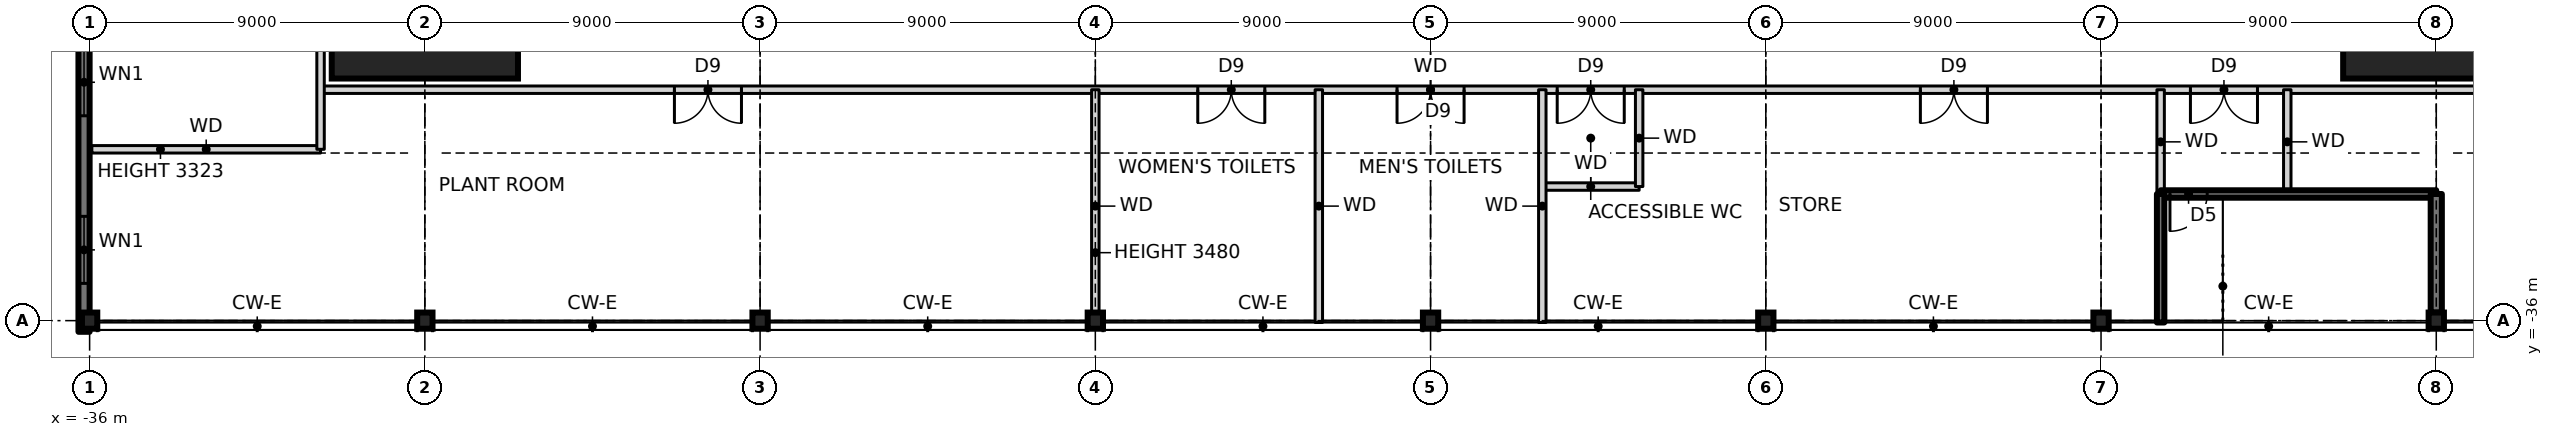
"""IFC4 building model, lengths in metres.
Left out: names, types, materials, properties, quantities, classifications, styles, units other than length and angle.
Written with IfcOpenShell. Run it as: python <this file> out.ifc"""

import sys

from ifc_helpers import new_model, si_unit, direction, frame, frame_2d, origin, origin_2d, place, context, subcontext, project, spatial, rectangle, i_section, extrude, element, fill, save


model = new_model("IFC4")
c1 = context("Model", 3, precision=1e-05, world=origin(), true_north=direction((0.0, 1.0)))
c2 = subcontext(c1, "Body", "Model", "MODEL_VIEW")
j1 = project(units=[si_unit("LENGTHUNIT", "METRE"), si_unit("PLANEANGLEUNIT", "RADIAN")], contexts=[c1])
p1 = place(None, origin())
s1 = spatial("IfcSite", under=j1, at=p1, CompositionType="ELEMENT")
p2 = place(p1, origin())
s2 = spatial("IfcBuilding", under=s1, at=p2, CompositionType="ELEMENT")
p3 = place(p2, frame((0.0, 0.0, 10.5)))
s3 = spatial("IfcBuildingStorey", under=s2, at=p3, CompositionType="ELEMENT", Elevation=10.5)
for number, where, z_axis, x_axis in (
    (1, (-27.0, -27.0, 0.0), (0.0, 0.0, 1.0), (1.0, 0.0, 0.0)),
    (2, (27.0, -27.0, 0.0), (0.0, 0.0, 1.0), (1.0, 0.0, 0.0)),
):
    element("IfcColumn", number, at=place(p3, frame(where, z_axis=z_axis, x_axis=x_axis)), inside=s3, PredefinedType="COLUMN", context=c2, shape_type="SweptSolid", body=[
        extrude(rectangle(XDim=5.0, YDim=5.0, at=origin_2d()), origin(), (0.0, 0.0, 1.0), 4.5),
        extrude(i_section(OverallWidth=0.478, OverallDepth=0.599, WebThickness=0.1, FlangeThickness=0.14, at=origin_2d()), origin(), (0.0, 0.0, 1.0), 4.5),
    ])
for number, where, z_axis, x_axis in (
    (3, (-36.0, -36.0, 0.0), (0.0, 0.0, 1.0), (1.0, 0.0, 0.0)),
    (4, (-27.0, -36.0, 0.0), (0.0, 0.0, 1.0), (1.0, 0.0, 0.0)),
    (5, (-18.0, -36.0, 0.0), (0.0, 0.0, 1.0), (1.0, 0.0, 0.0)),
    (6, (-9.0, -36.0, 0.0), (0.0, 0.0, 1.0), (1.0, 0.0, 0.0)),
    (7, (0.0, -36.0, 0.0), (0.0, 0.0, 1.0), (1.0, 0.0, 0.0)),
    (8, (9.0, -36.0, 0.0), (0.0, 0.0, 1.0), (1.0, 0.0, 0.0)),
    (9, (18.0, -36.0, 0.0), (0.0, 0.0, 1.0), (1.0, 0.0, 0.0)),
    (10, (27.0, -36.0, 0.0), (0.0, 0.0, 1.0), (1.0, 0.0, 0.0)),
):
    element("IfcColumn", number, at=place(p3, frame(where, z_axis=z_axis, x_axis=x_axis)), inside=s3, PredefinedType="COLUMN", context=c2, shape_type="SweptSolid", body=[
        extrude(i_section(OverallWidth=0.411, OverallDepth=0.434, WebThickness=0.036, FlangeThickness=0.057, at=origin_2d()), origin(), (0.0, 0.0, 1.0), 4.5),
    ])
p4 = place(p3, frame((-36.15, 36.3, -0.25), z_axis=(0.0, 0.0, 1.0), x_axis=(0.0, -1.0, 0.0)))
e11 = element("IfcWall", 11, at=p4, inside=s3, PredefinedType="SOLIDWALL", context=c2, shape_type="SweptSolid", body=[
    extrude(rectangle(XDim=72.6, YDim=0.3, at=frame_2d((36.3, 0.0))), origin(), (0.0, 0.0, 1.0), 4.75),
])
p5 = place(p4, frame((2.0, 0.0, 1.15)))
e12 = element("IfcOpeningElement", 12, at=p5, cuts=e11, PredefinedType="OPENING", context=c2, shape_type="SweptSolid", body=[
    extrude(rectangle(XDim=1.8, YDim=2.4, at=frame_2d((0.9, 1.2))), frame((0.0, 0.16, 0.0), z_axis=(0.0, -1.0, 0.0), x_axis=(1.0, 0.0, 0.0)), (0.0, 0.0, 1.0), 0.32),
])
p6 = place(p4, frame((6.5, 0.0, 1.15)))
e13 = element("IfcOpeningElement", 13, at=p6, cuts=e11, PredefinedType="OPENING", context=c2, shape_type="SweptSolid", body=[
    extrude(rectangle(XDim=1.8, YDim=2.4, at=frame_2d((0.9, 1.2))), frame((0.0, 0.16, 0.0), z_axis=(0.0, -1.0, 0.0), x_axis=(1.0, 0.0, 0.0)), (0.0, 0.0, 1.0), 0.32),
])
p7 = place(p4, frame((11.0, 0.0, 1.15)))
e14 = element("IfcOpeningElement", 14, at=p7, cuts=e11, PredefinedType="OPENING", context=c2, shape_type="SweptSolid", body=[
    extrude(rectangle(XDim=1.8, YDim=2.4, at=frame_2d((0.9, 1.2))), frame((0.0, 0.16, 0.0), z_axis=(0.0, -1.0, 0.0), x_axis=(1.0, 0.0, 0.0)), (0.0, 0.0, 1.0), 0.32),
])
p8 = place(p4, frame((15.5, 0.0, 1.15)))
e15 = element("IfcOpeningElement", 15, at=p8, cuts=e11, PredefinedType="OPENING", context=c2, shape_type="SweptSolid", body=[
    extrude(rectangle(XDim=1.8, YDim=2.4, at=frame_2d((0.9, 1.2))), frame((0.0, 0.16, 0.0), z_axis=(0.0, -1.0, 0.0), x_axis=(1.0, 0.0, 0.0)), (0.0, 0.0, 1.0), 0.32),
])
p9 = place(p4, frame((20.0, 0.0, 1.15)))
e16 = element("IfcOpeningElement", 16, at=p9, cuts=e11, PredefinedType="OPENING", context=c2, shape_type="SweptSolid", body=[
    extrude(rectangle(XDim=1.8, YDim=2.4, at=frame_2d((0.9, 1.2))), frame((0.0, 0.16, 0.0), z_axis=(0.0, -1.0, 0.0), x_axis=(1.0, 0.0, 0.0)), (0.0, 0.0, 1.0), 0.32),
])
p10 = place(p4, frame((24.5, 0.0, 1.15)))
e17 = element("IfcOpeningElement", 17, at=p10, cuts=e11, PredefinedType="OPENING", context=c2, shape_type="SweptSolid", body=[
    extrude(rectangle(XDim=1.8, YDim=2.4, at=frame_2d((0.9, 1.2))), frame((0.0, 0.16, 0.0), z_axis=(0.0, -1.0, 0.0), x_axis=(1.0, 0.0, 0.0)), (0.0, 0.0, 1.0), 0.32),
])
p11 = place(p4, frame((29.0, 0.0, 1.15)))
e18 = element("IfcOpeningElement", 18, at=p11, cuts=e11, PredefinedType="OPENING", context=c2, shape_type="SweptSolid", body=[
    extrude(rectangle(XDim=1.8, YDim=2.4, at=frame_2d((0.9, 1.2))), frame((0.0, 0.16, 0.0), z_axis=(0.0, -1.0, 0.0), x_axis=(1.0, 0.0, 0.0)), (0.0, 0.0, 1.0), 0.32),
])
p12 = place(p4, frame((42.5, 0.0, 1.15)))
e19 = element("IfcOpeningElement", 19, at=p12, cuts=e11, PredefinedType="OPENING", context=c2, shape_type="SweptSolid", body=[
    extrude(rectangle(XDim=1.8, YDim=2.4, at=frame_2d((0.9, 1.2))), frame((0.0, 0.16, 0.0), z_axis=(0.0, -1.0, 0.0), x_axis=(1.0, 0.0, 0.0)), (0.0, 0.0, 1.0), 0.32),
])
p13 = place(p4, frame((47.0, 0.0, 1.15)))
e20 = element("IfcOpeningElement", 20, at=p13, cuts=e11, PredefinedType="OPENING", context=c2, shape_type="SweptSolid", body=[
    extrude(rectangle(XDim=1.8, YDim=2.4, at=frame_2d((0.9, 1.2))), frame((0.0, 0.16, 0.0), z_axis=(0.0, -1.0, 0.0), x_axis=(1.0, 0.0, 0.0)), (0.0, 0.0, 1.0), 0.32),
])
p14 = place(p4, frame((51.5, 0.0, 1.15)))
e21 = element("IfcOpeningElement", 21, at=p14, cuts=e11, PredefinedType="OPENING", context=c2, shape_type="SweptSolid", body=[
    extrude(rectangle(XDim=1.8, YDim=2.4, at=frame_2d((0.9, 1.2))), frame((0.0, 0.16, 0.0), z_axis=(0.0, -1.0, 0.0), x_axis=(1.0, 0.0, 0.0)), (0.0, 0.0, 1.0), 0.32),
])
p15 = place(p4, frame((56.0, 0.0, 1.15)))
e22 = element("IfcOpeningElement", 22, at=p15, cuts=e11, PredefinedType="OPENING", context=c2, shape_type="SweptSolid", body=[
    extrude(rectangle(XDim=1.8, YDim=2.4, at=frame_2d((0.9, 1.2))), frame((0.0, 0.16, 0.0), z_axis=(0.0, -1.0, 0.0), x_axis=(1.0, 0.0, 0.0)), (0.0, 0.0, 1.0), 0.32),
])
p16 = place(p4, frame((60.5, 0.0, 1.15)))
e23 = element("IfcOpeningElement", 23, at=p16, cuts=e11, PredefinedType="OPENING", context=c2, shape_type="SweptSolid", body=[
    extrude(rectangle(XDim=1.8, YDim=2.4, at=frame_2d((0.9, 1.2))), frame((0.0, 0.16, 0.0), z_axis=(0.0, -1.0, 0.0), x_axis=(1.0, 0.0, 0.0)), (0.0, 0.0, 1.0), 0.32),
])
p17 = place(p4, frame((65.0, 0.0, 1.15)))
e24 = element("IfcOpeningElement", 24, at=p17, cuts=e11, PredefinedType="OPENING", context=c2, shape_type="SweptSolid", body=[
    extrude(rectangle(XDim=1.8, YDim=2.4, at=frame_2d((0.9, 1.2))), frame((0.0, 0.16, 0.0), z_axis=(0.0, -1.0, 0.0), x_axis=(1.0, 0.0, 0.0)), (0.0, 0.0, 1.0), 0.32),
])
p18 = place(p4, frame((69.5, 0.0, 1.15)))
e25 = element("IfcOpeningElement", 25, at=p18, cuts=e11, PredefinedType="OPENING", context=c2, shape_type="SweptSolid", body=[
    extrude(rectangle(XDim=1.8, YDim=2.4, at=frame_2d((0.9, 1.2))), frame((0.0, 0.16, 0.0), z_axis=(0.0, -1.0, 0.0), x_axis=(1.0, 0.0, 0.0)), (0.0, 0.0, 1.0), 0.32),
])
p19 = place(p3, frame((19.6, -32.6, 0.0), z_axis=(0.0, 0.0, 1.0), x_axis=(1.0, 0.0, 0.0)))
e26 = element("IfcWall", 26, at=p19, inside=s3, PredefinedType="SOLIDWALL", context=c2, shape_type="SweptSolid", body=[
    extrude(rectangle(XDim=7.4, YDim=0.2, at=frame_2d((3.7, 0.0))), origin(), (0.0, 0.0, 1.0), 4.5),
])
p20 = place(p19, frame((0.25, 0.0, 0.0)))
e27 = element("IfcOpeningElement", 27, at=p20, cuts=e26, PredefinedType="OPENING", context=c2, shape_type="SweptSolid", body=[
    extrude(rectangle(XDim=1.0, YDim=2.1, at=frame_2d((0.5, 1.05))), frame((0.0, 0.11, 0.0), z_axis=(0.0, -1.0, 0.0), x_axis=(1.0, 0.0, 0.0)), (0.0, 0.0, 1.0), 0.22),
])
p21 = place(p3, frame((3.0, -32.4, 0.0), z_axis=(0.0, 0.0, 1.0), x_axis=(1.0, 0.0, 0.0)))
e28 = element("IfcWall", 28, at=p21, inside=s3, PredefinedType="SOLIDWALL", context=c2, shape_type="SweptSolid", body=[
    extrude(rectangle(XDim=2.6, YDim=0.2, at=frame_2d((1.3, 0.0))), origin(), (0.0, 0.0, 1.0), 4.25),
])
p22 = place(p3, frame((-35.94, -31.4, 0.0), z_axis=(0.0, 0.0, 1.0), x_axis=(1.0, 0.0, 0.0)))
e29 = element("IfcWall", 29, at=p22, inside=s3, PredefinedType="SOLIDWALL", context=c2, shape_type="SweptSolid", body=[
    extrude(rectangle(XDim=6.14, YDim=0.2, at=frame_2d((3.07, 0.0))), origin(), (0.0, 0.0, 1.0), 3.323),
])
p23 = place(p3, frame((-29.8, -29.8, 0.0), z_axis=(0.0, 0.0, 1.0), x_axis=(1.0, 0.0, 0.0)))
e30 = element("IfcWall", 30, at=p23, inside=s3, PredefinedType="SOLIDWALL", context=c2, shape_type="SweptSolid", body=[
    extrude(rectangle(XDim=59.6, YDim=0.2, at=frame_2d((29.8, 0.0))), origin(), (0.0, 0.0, 1.0), 4.25),
])
p24 = place(p23, frame((9.5, 0.0, 0.0)))
e31 = element("IfcOpeningElement", 31, at=p24, cuts=e30, PredefinedType="OPENING", context=c2, shape_type="SweptSolid", body=[
    extrude(rectangle(XDim=1.8, YDim=2.1, at=frame_2d((0.9, 1.05))), frame((0.0, 0.11, 0.0), z_axis=(0.0, -1.0, 0.0), x_axis=(1.0, 0.0, 0.0)), (0.0, 0.0, 1.0), 0.22),
])
p25 = place(p23, frame((23.55, 0.0, 0.0)))
e32 = element("IfcOpeningElement", 32, at=p25, cuts=e30, PredefinedType="OPENING", context=c2, shape_type="SweptSolid", body=[
    extrude(rectangle(XDim=1.8, YDim=2.1, at=frame_2d((0.9, 1.05))), frame((0.0, 0.11, 0.0), z_axis=(0.0, -1.0, 0.0), x_axis=(1.0, 0.0, 0.0)), (0.0, 0.0, 1.0), 0.22),
])
p26 = place(p23, frame((28.9, 0.0, 0.0)))
e33 = element("IfcOpeningElement", 33, at=p26, cuts=e30, PredefinedType="OPENING", context=c2, shape_type="SweptSolid", body=[
    extrude(rectangle(XDim=1.8, YDim=2.1, at=frame_2d((0.9, 1.05))), frame((0.0, 0.11, 0.0), z_axis=(0.0, -1.0, 0.0), x_axis=(1.0, 0.0, 0.0)), (0.0, 0.0, 1.0), 0.22),
])
p27 = place(p23, frame((33.2, 0.0, 0.0)))
e34 = element("IfcOpeningElement", 34, at=p27, cuts=e30, PredefinedType="OPENING", context=c2, shape_type="SweptSolid", body=[
    extrude(rectangle(XDim=1.8, YDim=2.1, at=frame_2d((0.9, 1.05))), frame((0.0, 0.11, 0.0), z_axis=(0.0, -1.0, 0.0), x_axis=(1.0, 0.0, 0.0)), (0.0, 0.0, 1.0), 0.22),
])
p28 = place(p23, frame((42.95, 0.0, 0.0)))
e35 = element("IfcOpeningElement", 35, at=p28, cuts=e30, PredefinedType="OPENING", context=c2, shape_type="SweptSolid", body=[
    extrude(rectangle(XDim=1.8, YDim=2.1, at=frame_2d((0.9, 1.05))), frame((0.0, 0.11, 0.0), z_axis=(0.0, -1.0, 0.0), x_axis=(1.0, 0.0, 0.0)), (0.0, 0.0, 1.0), 0.22),
])
p29 = place(p23, frame((50.2, 0.0, 0.0)))
e36 = element("IfcOpeningElement", 36, at=p29, cuts=e30, PredefinedType="OPENING", context=c2, shape_type="SweptSolid", body=[
    extrude(rectangle(XDim=1.8, YDim=2.1, at=frame_2d((0.9, 1.05))), frame((0.0, 0.11, 0.0), z_axis=(0.0, -1.0, 0.0), x_axis=(1.0, 0.0, 0.0)), (0.0, 0.0, 1.0), 0.22),
])
p30 = place(p3, frame((27.0, -35.783, 0.0), z_axis=(0.0, 0.0, 1.0), x_axis=(0.0, 1.0, 0.0)))
e37 = element("IfcWall", 37, at=p30, inside=s3, PredefinedType="SOLIDWALL", context=c2, shape_type="SweptSolid", body=[
    extrude(rectangle(XDim=3.183, YDim=0.3, at=frame_2d((1.591, 0.0))), origin(), (0.0, 0.0, 1.0), 4.5),
])
p31 = place(p3, frame((23.0, -32.6, 0.0), z_axis=(0.0, 0.0, 1.0), x_axis=(0.0, 1.0, 0.0)))
e38 = element("IfcWall", 38, at=p31, inside=s3, PredefinedType="SOLIDWALL", context=c2, shape_type="SweptSolid", body=[
    extrude(rectangle(XDim=2.8, YDim=0.2, at=frame_2d((1.4, 0.0))), origin(), (0.0, 0.0, 1.0), 4.25),
])
p32 = place(p3, frame((19.6, -36.05, 0.0), z_axis=(0.0, 0.0, 1.0), x_axis=(0.0, 1.0, 0.0)))
e39 = element("IfcWall", 39, at=p32, inside=s3, PredefinedType="SOLIDWALL", context=c2, shape_type="SweptSolid", body=[
    extrude(rectangle(XDim=3.45, YDim=0.2, at=frame_2d((1.725, 0.0))), origin(), (0.0, 0.0, 1.0), 4.5),
])
p33 = place(p3, frame((19.6, -32.6, 0.0), z_axis=(0.0, 0.0, 1.0), x_axis=(0.0, 1.0, 0.0)))
e40 = element("IfcWall", 40, at=p33, inside=s3, PredefinedType="SOLIDWALL", context=c2, shape_type="SweptSolid", body=[
    extrude(rectangle(XDim=2.8, YDim=0.2, at=frame_2d((1.4, 0.0))), origin(), (0.0, 0.0, 1.0), 4.25),
])
p34 = place(p3, frame((5.6, -32.4, 0.0), z_axis=(0.0, 0.0, 1.0), x_axis=(0.0, 1.0, 0.0)))
e41 = element("IfcWall", 41, at=p34, inside=s3, PredefinedType="SOLIDWALL", context=c2, shape_type="SweptSolid", body=[
    extrude(rectangle(XDim=2.6, YDim=0.2, at=frame_2d((1.3, 0.0))), origin(), (0.0, 0.0, 1.0), 4.25),
])
for number, where, z_axis, x_axis in (
    (42, (3.0, -36.05, 0.0), (0.0, 0.0, 1.0), (0.0, 1.0, 0.0)),
    (43, (-3.0, -36.05, 0.0), (0.0, 0.0, 1.0), (0.0, 1.0, 0.0)),
):
    element("IfcWall", number, at=place(p3, frame(where, z_axis=z_axis, x_axis=x_axis)), inside=s3, PredefinedType="SOLIDWALL", context=c2, shape_type="SweptSolid", body=[
        extrude(rectangle(XDim=6.25, YDim=0.2, at=frame_2d((3.125, 0.0))), origin(), (0.0, 0.0, 1.0), 4.25),
    ])
p35 = place(p3, frame((-9.0, -36.05, 0.0), z_axis=(0.0, 0.0, 1.0), x_axis=(0.0, 1.0, 0.0)))
e44 = element("IfcWall", 44, at=p35, inside=s3, PredefinedType="SOLIDWALL", context=c2, shape_type="SweptSolid", body=[
    extrude(rectangle(XDim=6.25, YDim=0.2, at=frame_2d((3.125, 0.0))), origin(), (0.0, 0.0, 1.0), 3.48),
])
p36 = place(p3, frame((-29.8, -31.4, 0.0), z_axis=(0.0, 0.0, 1.0), x_axis=(0.0, 1.0, 0.0)))
e45 = element("IfcWall", 45, at=p36, inside=s3, PredefinedType="SOLIDWALL", context=c2, shape_type="SweptSolid", body=[
    extrude(rectangle(XDim=62.55, YDim=0.2, at=frame_2d((31.275, 0.0))), origin(), (0.0, 0.0, 1.0), 4.25),
])
p37 = place(p36, frame((8.675, 0.0, 0.0)))
e46 = element("IfcOpeningElement", 46, at=p37, cuts=e45, PredefinedType="OPENING", context=c2, shape_type="SweptSolid", body=[
    extrude(rectangle(XDim=1.8, YDim=2.1, at=frame_2d((0.9, 1.05))), frame((0.0, 0.11, 0.0), z_axis=(0.0, -1.0, 0.0), x_axis=(1.0, 0.0, 0.0)), (0.0, 0.0, 1.0), 0.22),
])
p38 = place(p36, frame((25.175, 0.0, 0.0)))
e47 = element("IfcOpeningElement", 47, at=p38, cuts=e45, PredefinedType="OPENING", context=c2, shape_type="SweptSolid", body=[
    extrude(rectangle(XDim=1.8, YDim=2.1, at=frame_2d((0.9, 1.05))), frame((0.0, 0.11, 0.0), z_axis=(0.0, -1.0, 0.0), x_axis=(1.0, 0.0, 0.0)), (0.0, 0.0, 1.0), 0.22),
])
p39 = place(p36, frame((30.5, 0.0, 0.0)))
e48 = element("IfcOpeningElement", 48, at=p39, cuts=e45, PredefinedType="OPENING", context=c2, shape_type="SweptSolid", body=[
    extrude(rectangle(XDim=1.8, YDim=2.1, at=frame_2d((0.9, 1.05))), frame((0.0, 0.11, 0.0), z_axis=(0.0, -1.0, 0.0), x_axis=(1.0, 0.0, 0.0)), (0.0, 0.0, 1.0), 0.22),
])
p40 = place(p36, frame((35.85, 0.0, 0.0)))
e49 = element("IfcOpeningElement", 49, at=p40, cuts=e45, PredefinedType="OPENING", context=c2, shape_type="SweptSolid", body=[
    extrude(rectangle(XDim=1.8, YDim=2.1, at=frame_2d((0.9, 1.05))), frame((0.0, 0.11, 0.0), z_axis=(0.0, -1.0, 0.0), x_axis=(1.0, 0.0, 0.0)), (0.0, 0.0, 1.0), 0.22),
])
p41 = place(p36, frame((49.9, 0.0, 0.0)))
e50 = element("IfcOpeningElement", 50, at=p41, cuts=e45, PredefinedType="OPENING", context=c2, shape_type="SweptSolid", body=[
    extrude(rectangle(XDim=1.8, YDim=2.1, at=frame_2d((0.9, 1.05))), frame((0.0, 0.11, 0.0), z_axis=(0.0, -1.0, 0.0), x_axis=(1.0, 0.0, 0.0)), (0.0, 0.0, 1.0), 0.22),
])
p42 = place(p17, origin())
e51 = element("IfcWindow", 51, at=p42, inside=s3, PartitioningType="SINGLE_PANEL", PredefinedType="WINDOW", context=c2, shape_type="SweptSolid", body=[
    extrude(rectangle(XDim=1.8, YDim=2.4, at=frame_2d((0.9, 1.2))), frame((0.0, 0.03, 0.0), z_axis=(0.0, -1.0, 0.0), x_axis=(1.0, 0.0, 0.0)), (0.0, 0.0, 1.0), 0.06),
])
fill(e24, e51)
p43 = place(p18, origin())
e52 = element("IfcWindow", 52, at=p43, inside=s3, PartitioningType="SINGLE_PANEL", PredefinedType="WINDOW", context=c2, shape_type="SweptSolid", body=[
    extrude(rectangle(XDim=1.8, YDim=2.4, at=frame_2d((0.9, 1.2))), frame((0.0, 0.03, 0.0), z_axis=(0.0, -1.0, 0.0), x_axis=(1.0, 0.0, 0.0)), (0.0, 0.0, 1.0), 0.06),
])
fill(e25, e52)
p44 = place(p24, frame((1.8, 0.0, 0.0), z_axis=(0.0, 0.0, 1.0), x_axis=(-1.0, 0.0, 0.0)))
e53 = element("IfcDoor", 53, at=p44, inside=s3, OperationType="DOUBLE_DOOR_SINGLE_SWING", PredefinedType="DOOR", context=c2, shape_type="SweptSolid", body=[
    extrude(rectangle(XDim=1.8, YDim=2.1, at=frame_2d((0.9, 1.05))), frame((0.0, 0.025, 0.0), z_axis=(0.0, -1.0, 0.0), x_axis=(1.0, 0.0, 0.0)), (0.0, 0.0, 1.0), 0.05),
])
fill(e31, e53)
p45 = place(p25, frame((1.8, 0.0, 0.0), z_axis=(0.0, 0.0, 1.0), x_axis=(-1.0, 0.0, 0.0)))
e54 = element("IfcDoor", 54, at=p45, inside=s3, OperationType="DOUBLE_DOOR_SINGLE_SWING", PredefinedType="DOOR", context=c2, shape_type="SweptSolid", body=[
    extrude(rectangle(XDim=1.8, YDim=2.1, at=frame_2d((0.9, 1.05))), frame((0.0, 0.025, 0.0), z_axis=(0.0, -1.0, 0.0), x_axis=(1.0, 0.0, 0.0)), (0.0, 0.0, 1.0), 0.05),
])
fill(e32, e54)
p46 = place(p26, frame((1.8, 0.0, 0.0), z_axis=(0.0, 0.0, 1.0), x_axis=(-1.0, 0.0, 0.0)))
e55 = element("IfcDoor", 55, at=p46, inside=s3, OperationType="DOUBLE_DOOR_SINGLE_SWING", PredefinedType="DOOR", context=c2, shape_type="SweptSolid", body=[
    extrude(rectangle(XDim=1.8, YDim=2.1, at=frame_2d((0.9, 1.05))), frame((0.0, 0.025, 0.0), z_axis=(0.0, -1.0, 0.0), x_axis=(1.0, 0.0, 0.0)), (0.0, 0.0, 1.0), 0.05),
])
fill(e33, e55)
p47 = place(p27, frame((1.8, 0.0, 0.0), z_axis=(0.0, 0.0, 1.0), x_axis=(-1.0, 0.0, 0.0)))
e56 = element("IfcDoor", 56, at=p47, inside=s3, OperationType="DOUBLE_DOOR_SINGLE_SWING", PredefinedType="DOOR", context=c2, shape_type="SweptSolid", body=[
    extrude(rectangle(XDim=1.8, YDim=2.1, at=frame_2d((0.9, 1.05))), frame((0.0, 0.025, 0.0), z_axis=(0.0, -1.0, 0.0), x_axis=(1.0, 0.0, 0.0)), (0.0, 0.0, 1.0), 0.05),
])
fill(e34, e56)
p48 = place(p28, frame((1.8, 0.0, 0.0), z_axis=(0.0, 0.0, 1.0), x_axis=(-1.0, 0.0, 0.0)))
e57 = element("IfcDoor", 57, at=p48, inside=s3, OperationType="DOUBLE_DOOR_SINGLE_SWING", PredefinedType="DOOR", context=c2, shape_type="SweptSolid", body=[
    extrude(rectangle(XDim=1.8, YDim=2.1, at=frame_2d((0.9, 1.05))), frame((0.0, 0.025, 0.0), z_axis=(0.0, -1.0, 0.0), x_axis=(1.0, 0.0, 0.0)), (0.0, 0.0, 1.0), 0.05),
])
fill(e35, e57)
p49 = place(p29, frame((1.8, 0.0, 0.0), z_axis=(0.0, 0.0, 1.0), x_axis=(-1.0, 0.0, 0.0)))
e58 = element("IfcDoor", 58, at=p49, inside=s3, OperationType="DOUBLE_DOOR_SINGLE_SWING", PredefinedType="DOOR", context=c2, shape_type="SweptSolid", body=[
    extrude(rectangle(XDim=1.8, YDim=2.1, at=frame_2d((0.9, 1.05))), frame((0.0, 0.025, 0.0), z_axis=(0.0, -1.0, 0.0), x_axis=(1.0, 0.0, 0.0)), (0.0, 0.0, 1.0), 0.05),
])
fill(e36, e58)
p50 = place(p20, frame((1.0, 0.0, 0.0), z_axis=(0.0, 0.0, 1.0), x_axis=(-1.0, 0.0, 0.0)))
e59 = element("IfcDoor", 59, at=p50, inside=s3, OperationType="SINGLE_SWING_RIGHT", PredefinedType="DOOR", context=c2, shape_type="SweptSolid", body=[
    extrude(rectangle(XDim=1.0, YDim=2.1, at=frame_2d((0.5, 1.05))), frame((0.0, 0.025, 0.0), z_axis=(0.0, -1.0, 0.0), x_axis=(1.0, 0.0, 0.0)), (0.0, 0.0, 1.0), 0.05),
])
fill(e27, e59)
save(model, sys.argv[1])
